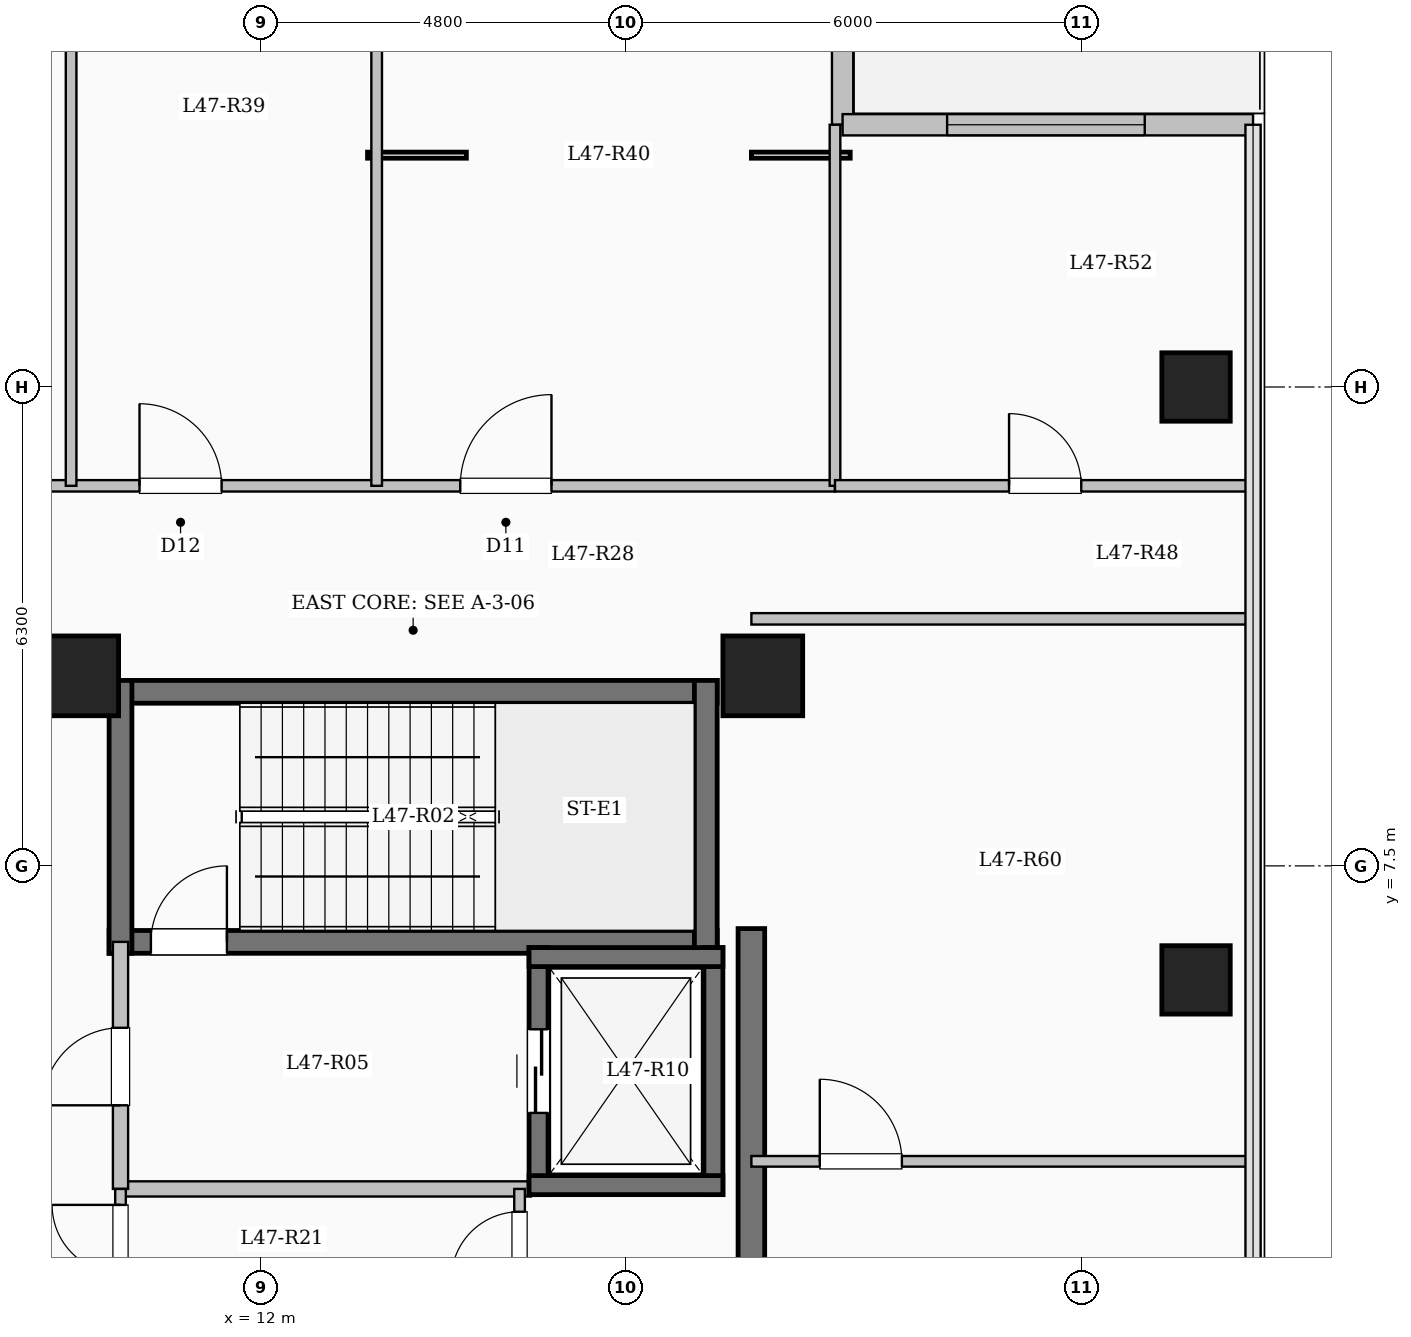
"""IFC4 building model, lengths in metres.
Left out: names, types, materials, properties, quantities, classifications, styles, units other than length and angle.
Written with IfcOpenShell. Run it as: python <this file> out.ifc"""

import sys

from ifc_helpers import new_model, si_unit, direction, frame, frame_2d, origin, origin_2d, place, context, subcontext, project, spatial, rectangle, extrude, element, fill, save


model = new_model("IFC4")
c1 = context("Model", 3, precision=1e-05, world=origin(), true_north=direction((0.0, 1.0)))
c2 = subcontext(c1, "Body", "Model", "MODEL_VIEW")
j1 = project(units=[si_unit("LENGTHUNIT", "METRE"), si_unit("PLANEANGLEUNIT", "RADIAN")], contexts=[c1])
p1 = place(None, origin())
s1 = spatial("IfcSite", under=j1, at=p1, CompositionType="ELEMENT")
p2 = place(p1, origin())
s2 = spatial("IfcBuilding", under=s1, at=p2, CompositionType="ELEMENT")
p3 = place(p2, frame((0.0, 0.0, 172.8)))
s3 = spatial("IfcBuildingStorey", under=s2, at=p3, CompositionType="ELEMENT", Elevation=172.8)
for number, where, z_axis, x_axis in (
    (1, (9.6, 10.0, 0.0), (0.0, 0.0, 1.0), (1.0, 0.0, 0.0)),
    (2, (18.6, 10.0, 0.0), (0.0, 0.0, 1.0), (1.0, 0.0, 0.0)),
):
    element("IfcColumn", number, at=place(p3, frame(where, z_axis=z_axis, x_axis=x_axis)), inside=s3, PredefinedType="COLUMN", context=c2, shape_type="SweptSolid", body=[
        extrude(rectangle(XDim=1.05, YDim=1.05, at=origin_2d()), origin(), (0.0, 0.0, 1.0), 4.5),
    ])
for number, where, z_axis, x_axis in (
    (3, (24.3, 6.0, 0.0), (0.0, 0.0, 1.0), (1.0, 0.0, 0.0)),
    (4, (24.3, 13.8, 0.0), (0.0, 0.0, 1.0), (1.0, 0.0, 0.0)),
):
    element("IfcColumn", number, at=place(p3, frame(where, z_axis=z_axis, x_axis=x_axis)), inside=s3, PredefinedType="COLUMN", context=c2, shape_type="SweptSolid", body=[
        extrude(rectangle(XDim=0.9, YDim=0.9, at=origin_2d()), origin(), (0.0, 0.0, 1.0), 4.5),
    ])
p4 = place(p3, frame((19.65, 21.15, 0.0), z_axis=(0.0, 0.0, 1.0), x_axis=(0.0, -1.0, 0.0)))
e5 = element("IfcWall", 5, at=p4, inside=s3, PredefinedType="SOLIDWALL", context=c2, shape_type="SweptSolid", body=[
    extrude(rectangle(XDim=3.9, YDim=0.28, at=frame_2d((1.95, 0.0))), origin(), (0.0, 0.0, 1.0), 4.2),
])
p5 = place(p4, frame((1.5, 0.0, 0.0)))
e6 = element("IfcOpeningElement", 6, at=p5, cuts=e5, PredefinedType="OPENING", context=c2, shape_type="SweptSolid", body=[
    extrude(rectangle(XDim=1.1, YDim=2.2, at=frame_2d((0.55, 1.1))), frame((0.0, 0.15, 0.0), z_axis=(0.0, -1.0, 0.0), x_axis=(1.0, 0.0, 0.0)), (0.0, 0.0, 1.0), 0.3),
])
p6 = place(p4, frame((0.355, 0.0, 0.95)))
e7 = element("IfcOpeningElement", 7, at=p6, cuts=e5, PredefinedType="OPENING", context=c2, shape_type="SweptSolid", body=[
    extrude(rectangle(XDim=1.0, YDim=1.5, at=frame_2d((0.5, 0.75))), frame((0.0, 0.15, 0.0), z_axis=(0.0, -1.0, 0.0), x_axis=(1.0, 0.0, 0.0)), (0.0, 0.0, 1.0), 0.3),
])
p7 = place(p3, frame((19.65, 17.25, 0.0), z_axis=(0.0, 0.0, 1.0), x_axis=(1.0, 0.0, 0.0)))
e8 = element("IfcWall", 8, at=p7, inside=s3, PredefinedType="SOLIDWALL", context=c2, shape_type="SweptSolid", body=[
    extrude(rectangle(XDim=5.4, YDim=0.28, at=frame_2d((2.7, 0.0))), origin(), (0.0, 0.0, 1.0), 4.2),
])
p8 = place(p7, frame((1.375, 0.0, 0.85)))
e9 = element("IfcOpeningElement", 9, at=p8, cuts=e8, PredefinedType="OPENING", context=c2, shape_type="SweptSolid", body=[
    extrude(rectangle(XDim=2.6, YDim=2.4, at=frame_2d((1.3, 1.2))), frame((0.0, 0.15, 0.0), z_axis=(0.0, -1.0, 0.0), x_axis=(1.0, 0.0, 0.0)), (0.0, 0.0, 1.0), 0.3),
])
p9 = place(p3, frame((10.0, 9.79, 0.0), z_axis=(0.0, 0.0, 1.0), x_axis=(1.0, 0.0, 0.0)))
e10 = element("IfcWall", 10, at=p9, inside=s3, PredefinedType="SHEAR", context=c2, shape_type="SweptSolid", body=[
    extrude(rectangle(XDim=8.0, YDim=0.3, at=frame_2d((4.0, 0.0))), origin(), (0.0, 0.0, 1.0), 4.5),
])
p10 = place(p3, frame((10.0, 6.5, 0.0), z_axis=(0.0, 0.0, 1.0), x_axis=(1.0, 0.0, 0.0)))
e11 = element("IfcWall", 11, at=p10, inside=s3, PredefinedType="SHEAR", context=c2, shape_type="SweptSolid", body=[
    extrude(rectangle(XDim=8.0, YDim=0.3, at=frame_2d((4.0, 0.0))), origin(), (0.0, 0.0, 1.0), 4.5),
])
p11 = place(p10, frame((0.55, 0.0, 0.0)))
e12 = element("IfcOpeningElement", 12, at=p11, cuts=e11, PredefinedType="OPENING", context=c2, shape_type="SweptSolid", body=[
    extrude(rectangle(XDim=1.0, YDim=2.15, at=frame_2d((0.5, 1.075))), frame((0.0, 0.16, 0.0), z_axis=(0.0, -1.0, 0.0), x_axis=(1.0, 0.0, 0.0)), (0.0, 0.0, 1.0), 0.32),
])
for number, where, z_axis, x_axis in (
    (13, (10.15, 6.35, 0.0), (0.0, 0.0, 1.0), (0.0, 1.0, 0.0)),
    (14, (17.85, 6.35, 0.0), (0.0, 0.0, 1.0), (0.0, 1.0, 0.0)),
):
    element("IfcWall", number, at=place(p3, frame(where, z_axis=z_axis, x_axis=x_axis)), inside=s3, PredefinedType="SHEAR", context=c2, shape_type="SweptSolid", body=[
        extrude(rectangle(XDim=3.59, YDim=0.3, at=frame_2d((1.795, 0.0))), origin(), (0.0, 0.0, 1.0), 4.5),
    ])
p12 = place(p3, frame((10.15, 3.25, 0.0), z_axis=(0.0, 0.0, 1.0), x_axis=(1.0, 0.0, 0.0)))
e15 = element("IfcWall", 15, at=p12, inside=s3, PredefinedType="SOLIDWALL", context=c2, shape_type="SweptSolid", body=[
    extrude(rectangle(XDim=5.4, YDim=0.2, at=frame_2d((2.7, 0.0))), origin(), (0.0, 0.0, 1.0), 4.2),
])
p13 = place(p3, frame((10.15, 3.25, 0.0), z_axis=(0.0, 0.0, 1.0), x_axis=(0.0, 1.0, 0.0)))
e16 = element("IfcWall", 16, at=p13, inside=s3, PredefinedType="SOLIDWALL", context=c2, shape_type="SweptSolid", body=[
    extrude(rectangle(XDim=3.25, YDim=0.2, at=frame_2d((1.625, 0.0))), origin(), (0.0, 0.0, 1.0), 4.2),
])
p14 = place(p13, frame((1.1, 0.0, 0.0)))
e17 = element("IfcOpeningElement", 17, at=p14, cuts=e16, PredefinedType="OPENING", context=c2, shape_type="SweptSolid", body=[
    extrude(rectangle(XDim=1.02, YDim=2.15, at=frame_2d((0.51, 1.075))), frame((0.0, 0.11, 0.0), z_axis=(0.0, -1.0, 0.0), x_axis=(1.0, 0.0, 0.0)), (0.0, 0.0, 1.0), 0.22),
])
p15 = place(p3, frame((15.65, 3.175, 0.0), z_axis=(0.0, 0.0, 1.0), x_axis=(0.0, 1.0, 0.0)))
e18 = element("IfcWall", 18, at=p15, inside=s3, PredefinedType="SHEAR", context=c2, shape_type="SweptSolid", body=[
    extrude(rectangle(XDim=3.25, YDim=0.25, at=frame_2d((1.625, 0.0))), origin(), (0.0, 0.0, 1.0), 4.5),
])
p16 = place(p15, frame((1.075, 0.0, 0.0)))
e19 = element("IfcOpeningElement", 19, at=p16, cuts=e18, PredefinedType="OPENING", context=c2, shape_type="SweptSolid", body=[
    extrude(rectangle(XDim=1.1, YDim=2.15, at=frame_2d((0.55, 1.075))), frame((0.0, 0.135, 0.0), z_axis=(0.0, -1.0, 0.0), x_axis=(1.0, 0.0, 0.0)), (0.0, 0.0, 1.0), 0.27),
])
p17 = place(p3, frame((17.95, 3.175, 0.0), z_axis=(0.0, 0.0, 1.0), x_axis=(0.0, 1.0, 0.0)))
e20 = element("IfcWall", 20, at=p17, inside=s3, PredefinedType="SHEAR", context=c2, shape_type="SweptSolid", body=[
    extrude(rectangle(XDim=3.25, YDim=0.25, at=frame_2d((1.625, 0.0))), origin(), (0.0, 0.0, 1.0), 4.5),
])
for number, where, z_axis, x_axis in (
    (21, (15.525, 3.3, 0.0), (0.0, 0.0, 1.0), (1.0, 0.0, 0.0)),
    (22, (15.525, 6.3, 0.0), (0.0, 0.0, 1.0), (1.0, 0.0, 0.0)),
):
    element("IfcWall", number, at=place(p3, frame(where, z_axis=z_axis, x_axis=x_axis)), inside=s3, PredefinedType="SHEAR", context=c2, shape_type="SweptSolid", body=[
        extrude(rectangle(XDim=2.55, YDim=0.25, at=frame_2d((1.275, 0.0))), origin(), (0.0, 0.0, 1.0), 4.5),
    ])
p18 = place(p3, frame((18.45, -7.375, 0.0), z_axis=(0.0, 0.0, 1.0), x_axis=(0.0, 1.0, 0.0)))
e23 = element("IfcWall", 23, at=p18, inside=s3, PredefinedType="SHEAR", context=c2, shape_type="SweptSolid", body=[
    extrude(rectangle(XDim=14.05, YDim=0.35, at=frame_2d((7.025, 0.0))), origin(), (0.0, 0.0, 1.0), 4.5),
])
p19 = place(p3, frame((10.15, 1.92, 0.0), z_axis=(0.0, 0.0, 1.0), x_axis=(0.0, 1.0, 0.0)))
e24 = element("IfcWall", 24, at=p19, inside=s3, PredefinedType="PARTITIONING", context=c2, shape_type="SweptSolid", body=[
    extrude(rectangle(XDim=1.33, YDim=0.14, at=frame_2d((0.665, 0.0))), origin(), (0.0, 0.0, 1.0), 4.2),
])
p20 = place(p19, frame((0.22, 0.0, 0.0)))
e25 = element("IfcOpeningElement", 25, at=p20, cuts=e24, PredefinedType="OPENING", context=c2, shape_type="SweptSolid", body=[
    extrude(rectangle(XDim=0.9, YDim=2.08, at=frame_2d((0.45, 1.04))), frame((0.0, 0.08, 0.0), z_axis=(0.0, -1.0, 0.0), x_axis=(1.0, 0.0, 0.0)), (0.0, 0.0, 1.0), 0.16),
])
p21 = place(p3, frame((15.4, -7.2, 0.0), z_axis=(0.0, 0.0, 1.0), x_axis=(0.0, 1.0, 0.0)))
e26 = element("IfcWall", 26, at=p21, inside=s3, PredefinedType="PARTITIONING", context=c2, shape_type="SweptSolid", body=[
    extrude(rectangle(XDim=10.45, YDim=0.14, at=frame_2d((5.225, 0.0))), origin(), (0.0, 0.0, 1.0), 4.2),
])
p22 = place(p21, frame((9.25, 0.0, 0.0)))
e27 = element("IfcOpeningElement", 27, at=p22, cuts=e26, PredefinedType="OPENING", context=c2, shape_type="SweptSolid", body=[
    extrude(rectangle(XDim=0.9, YDim=2.08, at=frame_2d((0.45, 1.04))), frame((0.0, 0.08, 0.0), z_axis=(0.0, -1.0, 0.0), x_axis=(1.0, 0.0, 0.0)), (0.0, 0.0, 1.0), 0.16),
])
p23 = place(p3, frame((3.85, 12.5, 0.0), z_axis=(0.0, 0.0, 1.0), x_axis=(1.0, 0.0, 0.0)))
e28 = element("IfcWall", 28, at=p23, inside=s3, PredefinedType="PARTITIONING", context=c2, shape_type="SweptSolid", body=[
    extrude(rectangle(XDim=15.7, YDim=0.15, at=frame_2d((7.85, 0.0))), origin(), (0.0, 0.0, 1.0), 4.2),
])
p24 = place(p23, frame((0.8, 0.0, 0.0)))
e29 = element("IfcOpeningElement", 29, at=p24, cuts=e28, PredefinedType="OPENING", context=c2, shape_type="SweptSolid", body=[
    extrude(rectangle(XDim=0.95, YDim=2.15, at=frame_2d((0.475, 1.075))), frame((0.0, 0.085, 0.0), z_axis=(0.0, -1.0, 0.0), x_axis=(1.0, 0.0, 0.0)), (0.0, 0.0, 1.0), 0.17),
])
p25 = place(p23, frame((3.6, 0.0, 0.0)))
e30 = element("IfcOpeningElement", 30, at=p25, cuts=e28, PredefinedType="OPENING", context=c2, shape_type="SweptSolid", body=[
    extrude(rectangle(XDim=0.95, YDim=2.15, at=frame_2d((0.475, 1.075))), frame((0.0, 0.085, 0.0), z_axis=(0.0, -1.0, 0.0), x_axis=(1.0, 0.0, 0.0)), (0.0, 0.0, 1.0), 0.17),
])
p26 = place(p23, frame((6.55, 0.0, 0.0)))
e31 = element("IfcOpeningElement", 31, at=p26, cuts=e28, PredefinedType="OPENING", context=c2, shape_type="SweptSolid", body=[
    extrude(rectangle(XDim=1.08, YDim=2.15, at=frame_2d((0.54, 1.075))), frame((0.0, 0.085, 0.0), z_axis=(0.0, -1.0, 0.0), x_axis=(1.0, 0.0, 0.0)), (0.0, 0.0, 1.0), 0.17),
])
p27 = place(p23, frame((10.77, 0.0, 0.0)))
e32 = element("IfcOpeningElement", 32, at=p27, cuts=e28, PredefinedType="OPENING", context=c2, shape_type="SweptSolid", body=[
    extrude(rectangle(XDim=1.2, YDim=2.15, at=frame_2d((0.6, 1.075))), frame((0.0, 0.085, 0.0), z_axis=(0.0, -1.0, 0.0), x_axis=(1.0, 0.0, 0.0)), (0.0, 0.0, 1.0), 0.17),
])
p28 = place(p3, frame((9.5, 12.5, 0.0), z_axis=(0.0, 0.0, 1.0), x_axis=(0.0, 1.0, 0.0)))
e33 = element("IfcWall", 33, at=p28, inside=s3, PredefinedType="PARTITIONING", context=c2, shape_type="SweptSolid", body=[
    extrude(rectangle(XDim=9.07, YDim=0.14, at=frame_2d((4.535, 0.0))), origin(), (0.0, 0.0, 1.0), 4.2),
])
p29 = place(p3, frame((13.52, 12.5, 0.0), z_axis=(0.0, 0.0, 1.0), x_axis=(0.0, 1.0, 0.0)))
e34 = element("IfcWall", 34, at=p29, inside=s3, PredefinedType="PARTITIONING", context=c2, shape_type="SweptSolid", body=[
    extrude(rectangle(XDim=8.7, YDim=0.14, at=frame_2d((4.35, 0.0))), origin(), (0.0, 0.0, 1.0), 4.2),
])
p30 = place(p3, frame((18.45, 10.75, 0.0), z_axis=(0.0, 0.0, 1.0), x_axis=(1.0, 0.0, 0.0)))
e35 = element("IfcWall", 35, at=p30, inside=s3, PredefinedType="PARTITIONING", context=c2, shape_type="SweptSolid", body=[
    extrude(rectangle(XDim=6.63, YDim=0.15, at=frame_2d((3.315, 0.0))), origin(), (0.0, 0.0, 1.0), 4.2),
])
p31 = place(p3, frame((19.55, 12.5, 0.0), z_axis=(0.0, 0.0, 1.0), x_axis=(0.0, 1.0, 0.0)))
e36 = element("IfcWall", 36, at=p31, inside=s3, PredefinedType="PARTITIONING", context=c2, shape_type="SweptSolid", body=[
    extrude(rectangle(XDim=4.75, YDim=0.14, at=frame_2d((2.375, 0.0))), origin(), (0.0, 0.0, 1.0), 4.2),
])
p32 = place(p3, frame((19.55, 12.5, 0.0), z_axis=(0.0, 0.0, 1.0), x_axis=(1.0, 0.0, 0.0)))
e37 = element("IfcWall", 37, at=p32, inside=s3, PredefinedType="PARTITIONING", context=c2, shape_type="SweptSolid", body=[
    extrude(rectangle(XDim=5.53, YDim=0.15, at=frame_2d((2.765, 0.0))), origin(), (0.0, 0.0, 1.0), 4.2),
])
p33 = place(p32, frame((2.29, 0.0, 0.0)))
e38 = element("IfcOpeningElement", 38, at=p33, cuts=e37, PredefinedType="OPENING", context=c2, shape_type="SweptSolid", body=[
    extrude(rectangle(XDim=0.95, YDim=2.15, at=frame_2d((0.475, 1.075))), frame((0.0, 0.085, 0.0), z_axis=(0.0, -1.0, 0.0), x_axis=(1.0, 0.0, 0.0)), (0.0, 0.0, 1.0), 0.17),
])
p34 = place(p3, frame((18.45, 3.613, 0.0), z_axis=(0.0, 0.0, 1.0), x_axis=(1.0, 0.0, 0.0)))
e39 = element("IfcWall", 39, at=p34, inside=s3, PredefinedType="PARTITIONING", context=c2, shape_type="SweptSolid", body=[
    extrude(rectangle(XDim=6.63, YDim=0.14, at=frame_2d((3.315, 0.0))), origin(), (0.0, 0.0, 1.0), 4.2),
])
p35 = place(p34, frame((0.9, 0.0, 0.0)))
e40 = element("IfcOpeningElement", 40, at=p35, cuts=e39, PredefinedType="OPENING", context=c2, shape_type="SweptSolid", body=[
    extrude(rectangle(XDim=1.08, YDim=2.15, at=frame_2d((0.54, 1.075))), frame((0.0, 0.08, 0.0), z_axis=(0.0, -1.0, 0.0), x_axis=(1.0, 0.0, 0.0)), (0.0, 0.0, 1.0), 0.16),
])
p36 = place(p8, origin())
e41 = element("IfcWindow", 41, at=p36, inside=s3, PartitioningType="SINGLE_PANEL", PredefinedType="WINDOW", context=c2, shape_type="SweptSolid", body=[
    extrude(rectangle(XDim=2.6, YDim=2.4, at=frame_2d((1.3, 1.2))), frame((0.0, 0.03, 0.0), z_axis=(0.0, -1.0, 0.0), x_axis=(1.0, 0.0, 0.0)), (0.0, 0.0, 1.0), 0.06),
])
fill(e9, e41)
p37 = place(p11, origin())
e42 = element("IfcDoor", 42, at=p37, inside=s3, OperationType="SINGLE_SWING_RIGHT", PredefinedType="DOOR", context=c2, shape_type="SweptSolid", body=[
    extrude(rectangle(XDim=1.0, YDim=2.15, at=frame_2d((0.5, 1.075))), frame((0.0, 0.025, 0.0), z_axis=(0.0, -1.0, 0.0), x_axis=(1.0, 0.0, 0.0)), (0.0, 0.0, 1.0), 0.05),
])
fill(e12, e42)
p38 = place(p14, origin())
e43 = element("IfcDoor", 43, at=p38, inside=s3, OperationType="SINGLE_SWING_LEFT", PredefinedType="DOOR", context=c2, shape_type="SweptSolid", body=[
    extrude(rectangle(XDim=1.02, YDim=2.15, at=frame_2d((0.51, 1.075))), frame((0.0, 0.025, 0.0), z_axis=(0.0, -1.0, 0.0), x_axis=(1.0, 0.0, 0.0)), (0.0, 0.0, 1.0), 0.05),
])
fill(e17, e43)
p39 = place(p16, origin())
e44 = element("IfcDoor", 44, at=p39, inside=s3, OperationType="SLIDING_TO_LEFT", PredefinedType="DOOR", context=c2, shape_type="SweptSolid", body=[
    extrude(rectangle(XDim=1.1, YDim=2.15, at=frame_2d((0.55, 1.075))), frame((0.0, 0.025, 0.0), z_axis=(0.0, -1.0, 0.0), x_axis=(1.0, 0.0, 0.0)), (0.0, 0.0, 1.0), 0.05),
])
fill(e19, e44)
p40 = place(p20, origin())
e45 = element("IfcDoor", 45, at=p40, inside=s3, OperationType="SINGLE_SWING_RIGHT", PredefinedType="DOOR", context=c2, shape_type="SweptSolid", body=[
    extrude(rectangle(XDim=0.9, YDim=2.08, at=frame_2d((0.45, 1.04))), frame((0.0, 0.025, 0.0), z_axis=(0.0, -1.0, 0.0), x_axis=(1.0, 0.0, 0.0)), (0.0, 0.0, 1.0), 0.05),
])
fill(e25, e45)
p41 = place(p22, origin())
e46 = element("IfcDoor", 46, at=p41, inside=s3, OperationType="SINGLE_SWING_LEFT", PredefinedType="DOOR", context=c2, shape_type="SweptSolid", body=[
    extrude(rectangle(XDim=0.9, YDim=2.08, at=frame_2d((0.45, 1.04))), frame((0.0, 0.025, 0.0), z_axis=(0.0, -1.0, 0.0), x_axis=(1.0, 0.0, 0.0)), (0.0, 0.0, 1.0), 0.05),
])
fill(e27, e46)
p42 = place(p26, origin())
e47 = element("IfcDoor", 47, at=p42, inside=s3, OperationType="SINGLE_SWING_LEFT", PredefinedType="DOOR", context=c2, shape_type="SweptSolid", body=[
    extrude(rectangle(XDim=1.08, YDim=2.15, at=frame_2d((0.54, 1.075))), frame((0.0, 0.025, 0.0), z_axis=(0.0, -1.0, 0.0), x_axis=(1.0, 0.0, 0.0)), (0.0, 0.0, 1.0), 0.05),
])
fill(e31, e47)
p43 = place(p27, origin())
e48 = element("IfcDoor", 48, at=p43, inside=s3, OperationType="SINGLE_SWING_RIGHT", PredefinedType="DOOR", context=c2, shape_type="SweptSolid", body=[
    extrude(rectangle(XDim=1.2, YDim=2.15, at=frame_2d((0.6, 1.075))), frame((0.0, 0.025, 0.0), z_axis=(0.0, -1.0, 0.0), x_axis=(1.0, 0.0, 0.0)), (0.0, 0.0, 1.0), 0.05),
])
fill(e32, e48)
p44 = place(p33, origin())
e49 = element("IfcDoor", 49, at=p44, inside=s3, OperationType="SINGLE_SWING_LEFT", PredefinedType="DOOR", context=c2, shape_type="SweptSolid", body=[
    extrude(rectangle(XDim=0.95, YDim=2.15, at=frame_2d((0.475, 1.075))), frame((0.0, 0.025, 0.0), z_axis=(0.0, -1.0, 0.0), x_axis=(1.0, 0.0, 0.0)), (0.0, 0.0, 1.0), 0.05),
])
fill(e38, e49)
p45 = place(p35, origin())
e50 = element("IfcDoor", 50, at=p45, inside=s3, OperationType="SINGLE_SWING_LEFT", PredefinedType="DOOR", context=c2, shape_type="SweptSolid", body=[
    extrude(rectangle(XDim=1.08, YDim=2.15, at=frame_2d((0.54, 1.075))), frame((0.0, 0.025, 0.0), z_axis=(0.0, -1.0, 0.0), x_axis=(1.0, 0.0, 0.0)), (0.0, 0.0, 1.0), 0.05),
])
fill(e40, e50)
save(model, sys.argv[1])
